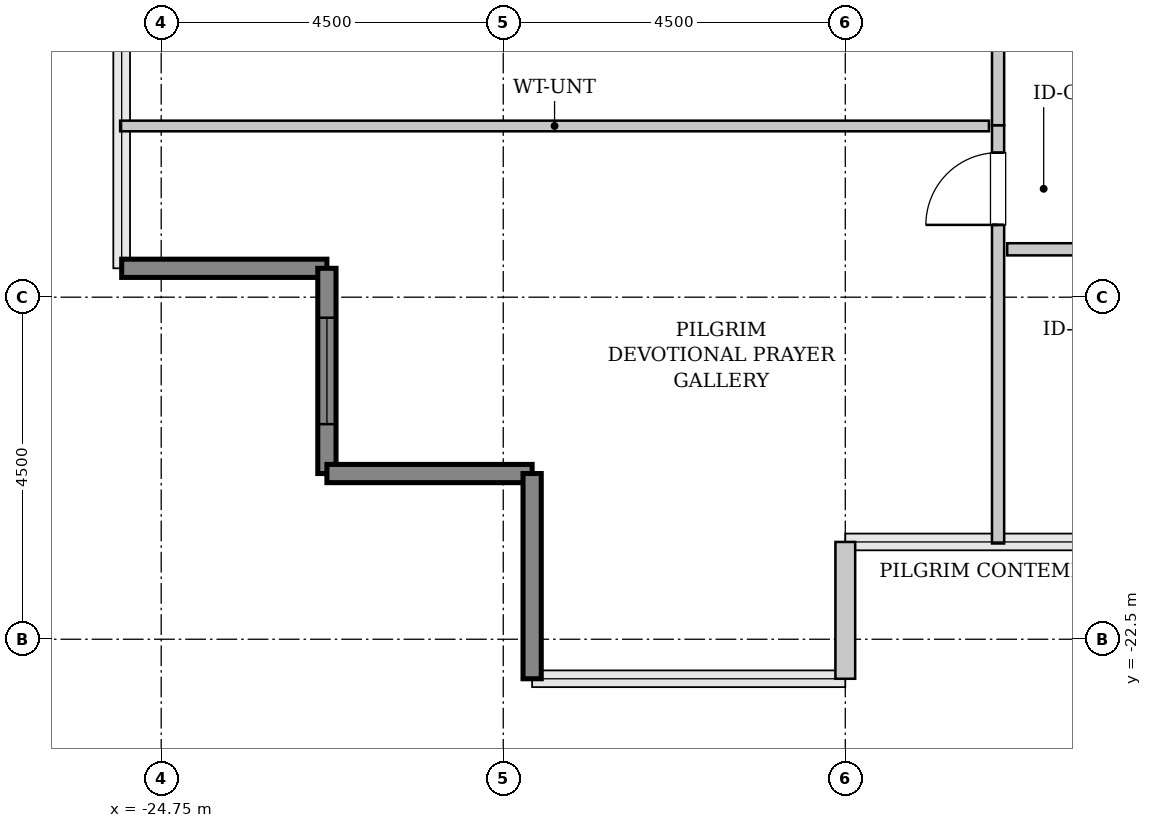
"""IFC4 building model, lengths in metres.
Left out: names, types, materials, properties, quantities, classifications, styles, units other than length and angle.
Written with IfcOpenShell. Run it as: python <this file> out.ifc"""

import sys

from ifc_helpers import new_model, si_unit, direction, frame, frame_2d, origin, place, context, subcontext, project, spatial, rectangle, extrude, source, transform, mapped, element, fill, save


model = new_model("IFC4")
c1 = context("Model", 3, precision=1e-05, world=origin(), true_north=direction((0.0, 1.0)))
c2 = subcontext(c1, "Body", "Model", "MODEL_VIEW")
j1 = project(units=[si_unit("LENGTHUNIT", "METRE"), si_unit("PLANEANGLEUNIT", "RADIAN")], contexts=[c1])
p1 = place(None, origin())
s1 = spatial("IfcSite", under=j1, at=p1, CompositionType="ELEMENT")
p2 = place(p1, origin())
s2 = spatial("IfcBuilding", under=s1, at=p2, CompositionType="ELEMENT")
p3 = place(p2, frame((0.0, 0.0, 237.0)))
s3 = spatial("IfcBuildingStorey", under=s2, at=p3, CompositionType="ELEMENT", Elevation=237.0)
m1 = source(origin(), c2, "Body", "SweptSolid", [
    extrude(rectangle(XDim=2.7, YDim=0.24, at=frame_2d((1.35, 0.0))), origin(), (0.0, 0.0, 1.0), 3.55),
])
p4 = place(p3, frame((-25.27, -17.62, 0.0), z_axis=(0.0, 0.0, 1.0), x_axis=(1.0, 0.0, 0.0)))
e1 = element("IfcWall", 1, at=p4, inside=s3, PredefinedType="SHEAR", context=c2, shape_type="MappedRepresentation", body=[
    mapped(m1, transform((0.0, 0.0, 0.0), x_axis=(1.0, 0.0, 0.0), y_axis=(0.0, 1.0, 0.0), z_axis=(0.0, 0.0, 1.0), scale=1.0)),
])
p5 = place(p3, frame((-22.57, -17.62, 0.0), z_axis=(0.0, 0.0, 1.0), x_axis=(0.0, -1.0, 0.0)))
e2 = element("IfcWall", 2, at=p5, inside=s3, PredefinedType="SHEAR", context=c2, shape_type="MappedRepresentation", body=[
    mapped(m1, transform((0.0, 0.0, 0.0), x_axis=(1.0, 0.0, 0.0), y_axis=(0.0, 1.0, 0.0), z_axis=(0.0, 0.0, 1.0), scale=1.0)),
])
p6 = place(p5, frame((0.65, 0.0, 0.85)))
e3 = element("IfcOpeningElement", 3, at=p6, cuts=e2, PredefinedType="OPENING", context=c2, shape_type="SweptSolid", body=[
    extrude(rectangle(XDim=1.4, YDim=1.8, at=frame_2d((0.7, 0.9))), frame((0.0, 0.13, 0.0), z_axis=(0.0, -1.0, 0.0), x_axis=(1.0, 0.0, 0.0)), (0.0, 0.0, 1.0), 0.26),
])
for number, where, z_axis, x_axis in (
    (4, (-22.57, -20.32, 0.0), (0.0, 0.0, 1.0), (1.0, 0.0, 0.0)),
    (5, (-19.87, -20.32, 0.0), (0.0, 0.0, 1.0), (0.0, -1.0, 0.0)),
):
    element("IfcWall", number, at=place(p3, frame(where, z_axis=z_axis, x_axis=x_axis)), inside=s3, PredefinedType="SHEAR", context=c2, shape_type="MappedRepresentation", body=[
        mapped(m1, transform((0.0, 0.0, 0.0), x_axis=(1.0, 0.0, 0.0), y_axis=(0.0, 1.0, 0.0), z_axis=(0.0, 0.0, 1.0), scale=1.0)),
    ])
m2 = source(origin(), c2, "Body", "SweptSolid", [
    extrude(rectangle(XDim=1.8, YDim=0.26, at=frame_2d((0.9, 0.0))), origin(), (0.0, 0.0, 1.0), 3.55),
])
p7 = place(p3, frame((-15.75, -23.02, 0.0), z_axis=(0.0, 0.0, 1.0), x_axis=(0.0, 1.0, 0.0)))
e6 = element("IfcWall", 6, at=p7, inside=s3, PredefinedType="SOLIDWALL", context=c2, shape_type="MappedRepresentation", body=[
    mapped(m2, transform((0.0, 0.0, 0.0), x_axis=(1.0, 0.0, 0.0), y_axis=(0.0, 1.0, 0.0), z_axis=(0.0, 0.0, 1.0), scale=1.0)),
])
m3 = source(origin(), c2, "Body", "SweptSolid", [
    extrude(rectangle(XDim=5.502, YDim=0.16, at=frame_2d((2.751, 0.0))), origin(), (0.0, 0.0, 1.0), 3.535),
])
p8 = place(p3, frame((-13.74, -21.24, 0.0), z_axis=(0.0, 0.0, 1.0), x_axis=(0.0, 1.0, 0.0)))
e7 = element("IfcWall", 7, at=p8, inside=s3, PredefinedType="PARTITIONING", context=c2, shape_type="MappedRepresentation", body=[
    mapped(m3, transform((0.0, 0.0, 0.0), x_axis=(1.0, 0.0, 0.0), y_axis=(0.0, 1.0, 0.0), z_axis=(0.0, 0.0, 1.0), scale=1.0)),
])
p9 = place(p8, frame((4.191, 0.0, 0.0)))
e8 = element("IfcOpeningElement", 8, at=p9, cuts=e7, PredefinedType="OPENING", context=c2, shape_type="SweptSolid", body=[
    extrude(rectangle(XDim=0.95, YDim=2.1, at=frame_2d((0.475, 1.05))), frame((0.0, 0.09, 0.0), z_axis=(0.0, -1.0, 0.0), x_axis=(1.0, 0.0, 0.0)), (0.0, 0.0, 1.0), 0.18),
])
m4 = source(origin(), c2, "Body", "SweptSolid", [
    extrude(rectangle(XDim=11.43, YDim=0.14, at=frame_2d((5.715, 0.0))), origin(), (0.0, 0.0, 1.0), 3.535),
])
p10 = place(p3, frame((-25.29, -15.748, 0.0), z_axis=(0.0, 0.0, 1.0), x_axis=(1.0, 0.0, 0.0)))
e9 = element("IfcWall", 9, at=p10, inside=s3, PredefinedType="PARTITIONING", context=c2, shape_type="MappedRepresentation", body=[
    mapped(m4, transform((0.0, 0.0, 0.0), x_axis=(1.0, 0.0, 0.0), y_axis=(0.0, 1.0, 0.0), z_axis=(0.0, 0.0, 1.0), scale=1.0)),
])
m5 = source(origin(), c2, "Body", "SweptSolid", [
    extrude(rectangle(XDim=7.242, YDim=0.16, at=frame_2d((3.621, 0.0))), origin(), (0.0, 0.0, 1.0), 3.535),
])
p11 = place(p3, frame((-13.74, -15.738, 0.0), z_axis=(0.0, 0.0, 1.0), x_axis=(0.0, 1.0, 0.0)))
e10 = element("IfcWall", 10, at=p11, inside=s3, PredefinedType="PARTITIONING", context=c2, shape_type="MappedRepresentation", body=[
    mapped(m5, transform((0.0, 0.0, 0.0), x_axis=(1.0, 0.0, 0.0), y_axis=(0.0, 1.0, 0.0), z_axis=(0.0, 0.0, 1.0), scale=1.0)),
])
p12 = place(p11, frame((3.146, 0.0, 0.0)))
e11 = element("IfcOpeningElement", 11, at=p12, cuts=e10, PredefinedType="OPENING", context=c2, shape_type="SweptSolid", body=[
    extrude(rectangle(XDim=0.95, YDim=2.1, at=frame_2d((0.475, 1.05))), frame((0.0, 0.09, 0.0), z_axis=(0.0, -1.0, 0.0), x_axis=(1.0, 0.0, 0.0)), (0.0, 0.0, 1.0), 0.18),
])
m6 = source(origin(), c2, "Body", "SweptSolid", [
    extrude(rectangle(XDim=4.025, YDim=0.16, at=frame_2d((2.013, 0.0))), origin(), (0.0, 0.0, 1.0), 3.535),
])
p13 = place(p3, frame((-13.62, -17.37, 0.0), z_axis=(0.0, 0.0, 1.0), x_axis=(1.0, 0.0, 0.0)))
e12 = element("IfcWall", 12, at=p13, inside=s3, PredefinedType="PARTITIONING", context=c2, shape_type="MappedRepresentation", body=[
    mapped(m6, transform((0.0, 0.0, 0.0), x_axis=(1.0, 0.0, 0.0), y_axis=(0.0, 1.0, 0.0), z_axis=(0.0, 0.0, 1.0), scale=1.0)),
])
p14 = place(p13, frame((0.934, 0.0, 0.0)))
e13 = element("IfcOpeningElement", 13, at=p14, cuts=e12, PredefinedType="OPENING", context=c2, shape_type="SweptSolid", body=[
    extrude(rectangle(XDim=0.95, YDim=2.1, at=frame_2d((0.475, 1.05))), frame((0.0, 0.09, 0.0), z_axis=(0.0, -1.0, 0.0), x_axis=(1.0, 0.0, 0.0)), (0.0, 0.0, 1.0), 0.18),
])
m7 = source(origin(), c2, "Body", "SweptSolid", [
    extrude(rectangle(XDim=1.4, YDim=1.8, at=frame_2d((0.7, 0.9))), frame((0.0, 0.03, 0.0), z_axis=(0.0, -1.0, 0.0), x_axis=(1.0, 0.0, 0.0)), (0.0, 0.0, 1.0), 0.06),
])
p15 = place(p6, origin())
e14 = element("IfcWindow", 14, at=p15, inside=s3, PartitioningType="SINGLE_PANEL", PredefinedType="WINDOW", context=c2, shape_type="MappedRepresentation", body=[
    mapped(m7, transform((0.0, 0.0, 0.0), x_axis=(1.0, 0.0, 0.0), y_axis=(0.0, 1.0, 0.0), z_axis=(0.0, 0.0, 1.0), scale=1.0)),
])
fill(e3, e14)
m8 = source(origin(), c2, "Body", "SweptSolid", [
    extrude(rectangle(XDim=0.95, YDim=2.1, at=frame_2d((0.475, 1.05))), frame((0.0, 0.025, 0.0), z_axis=(0.0, -1.0, 0.0), x_axis=(1.0, 0.0, 0.0)), (0.0, 0.0, 1.0), 0.05),
])
p16 = place(p9, origin())
e15 = element("IfcDoor", 15, at=p16, inside=s3, OperationType="SINGLE_SWING_LEFT", PredefinedType="DOOR", context=c2, shape_type="MappedRepresentation", body=[
    mapped(m8, transform((0.0, 0.0, 0.0), x_axis=(1.0, 0.0, 0.0), y_axis=(0.0, 1.0, 0.0), z_axis=(0.0, 0.0, 1.0), scale=1.0)),
])
fill(e8, e15)
save(model, sys.argv[1])
